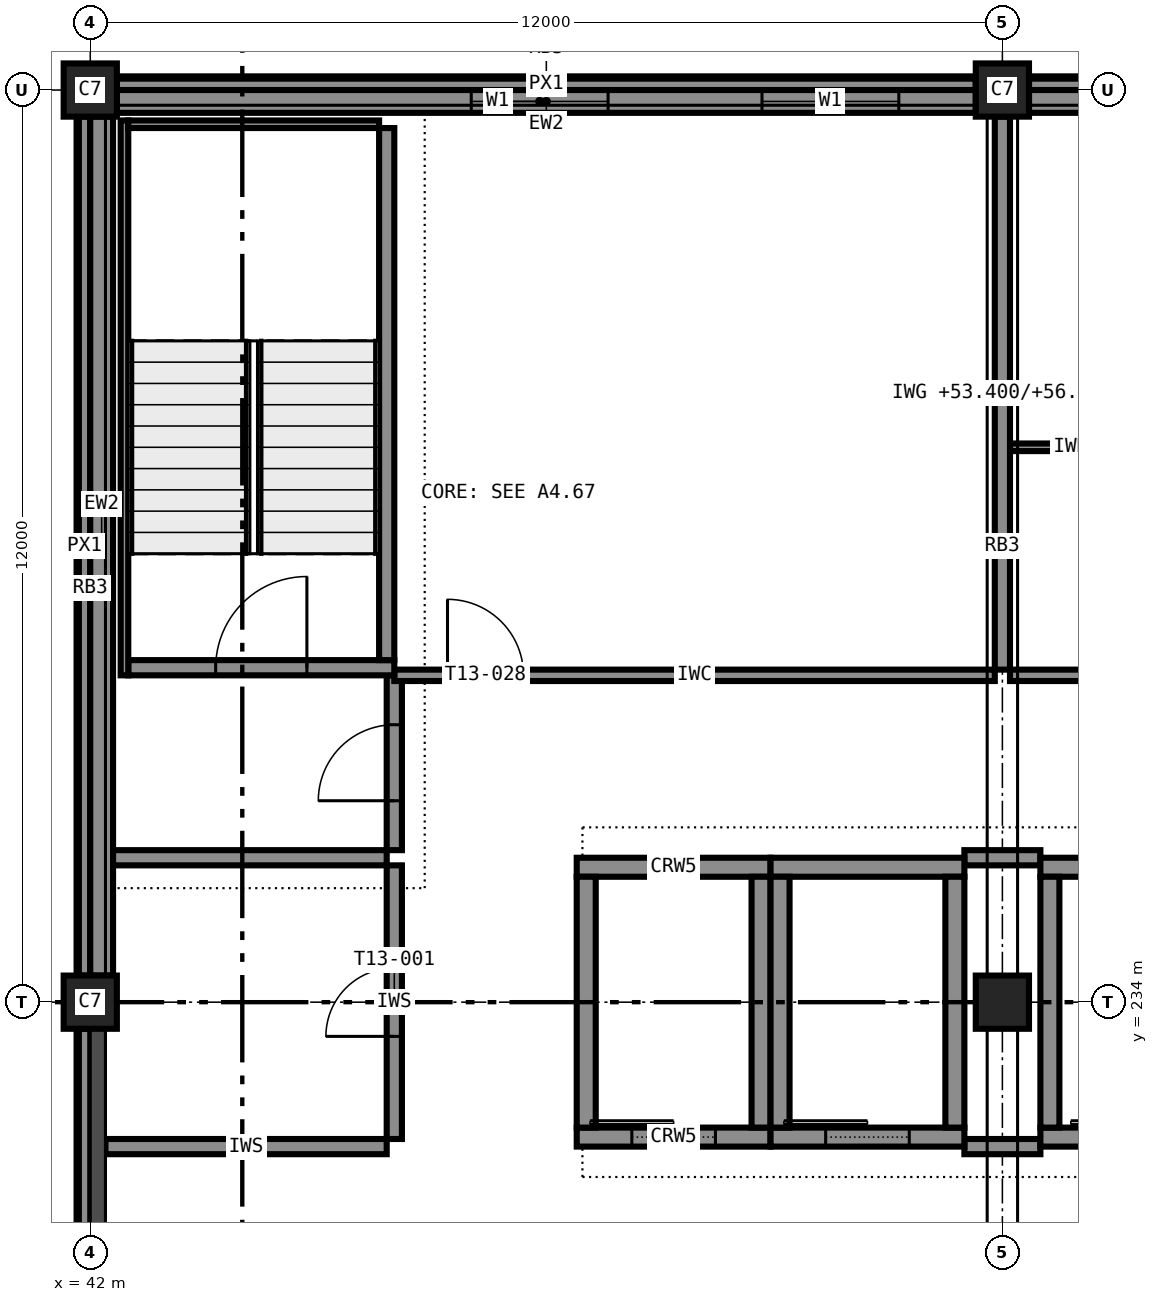
"""IFC4 building model, lengths in metres.
Left out: names, types, materials, properties, quantities, classifications, styles, units other than length and angle.
Written with IfcOpenShell. Run it as: python <this file> out.ifc"""

import sys

from ifc_helpers import new_model, si_unit, direction, frame, frame_2d, origin, origin_2d, place, context, subcontext, project, spatial, rectangle, extrude, element, fill, save


model = new_model("IFC4")
c1 = context("Model", 3, precision=1e-05, world=origin(), true_north=direction((0.0, 1.0)))
c2 = subcontext(c1, "Body", "Model", "MODEL_VIEW")
j1 = project(units=[si_unit("LENGTHUNIT", "METRE"), si_unit("PLANEANGLEUNIT", "RADIAN")], contexts=[c1])
p1 = place(None, origin())
s1 = spatial("IfcSite", under=j1, at=p1, CompositionType="ELEMENT")
p2 = place(p1, origin())
s2 = spatial("IfcBuilding", under=s1, at=p2, CompositionType="ELEMENT")
p3 = place(p2, frame((0.0, 0.0, 53.4)))
s3 = spatial("IfcBuildingStorey", under=s2, at=p3, CompositionType="ELEMENT", Elevation=53.4)
for number, where, z_axis, x_axis in (
    (1, (42.0, 234.0, 0.0), (0.0, 0.0, 1.0), (1.0, 0.0, 0.0)),
    (2, (42.0, 246.0, 0.0), (0.0, 0.0, 1.0), (1.0, 0.0, 0.0)),
    (3, (54.0, 234.0, 0.0), (0.0, 0.0, 1.0), (1.0, 0.0, 0.0)),
    (4, (54.0, 246.0, 0.0), (0.0, 0.0, 1.0), (1.0, 0.0, 0.0)),
):
    element("IfcColumn", number, at=place(p3, frame(where, z_axis=z_axis, x_axis=x_axis)), inside=s3, PredefinedType="COLUMN", context=c2, shape_type="SweptSolid", body=[
        extrude(rectangle(XDim=0.7, YDim=0.7, at=origin_2d()), origin(), (0.0, 0.0, 1.0), 3.6),
    ])
p4 = place(p3, frame((54.5, 232.225, 0.0), z_axis=(0.0, 0.0, 1.0), x_axis=(1.0, 0.0, 0.0)))
e5 = element("IfcWall", 5, at=p4, inside=s3, PredefinedType="SHEAR", context=c2, shape_type="SweptSolid", body=[
    extrude(rectangle(XDim=3.0, YDim=0.25, at=frame_2d((1.5, 0.0))), origin(), (0.0, 0.0, 1.0), 3.6),
])
p5 = place(p4, frame((0.95, 0.0, 0.0)))
e6 = element("IfcOpeningElement", 6, at=p5, cuts=e5, PredefinedType="OPENING", context=c2, shape_type="SweptSolid", body=[
    extrude(rectangle(XDim=1.1, YDim=2.1, at=frame_2d((0.55, 1.05))), frame((0.0, 0.135, 0.0), z_axis=(0.0, -1.0, 0.0), x_axis=(1.0, 0.0, 0.0)), (0.0, 0.0, 1.0), 0.27),
])
p6 = place(p3, frame((54.5, 235.775, 0.0), z_axis=(0.0, 0.0, 1.0), x_axis=(1.0, 0.0, 0.0)))
e7 = element("IfcWall", 7, at=p6, inside=s3, PredefinedType="SHEAR", context=c2, shape_type="SweptSolid", body=[
    extrude(rectangle(XDim=3.0, YDim=0.25, at=frame_2d((1.5, 0.0))), origin(), (0.0, 0.0, 1.0), 3.6),
])
p7 = place(p3, frame((54.625, 232.35, 0.0), z_axis=(0.0, 0.0, 1.0), x_axis=(0.0, 1.0, 0.0)))
e8 = element("IfcWall", 8, at=p7, inside=s3, PredefinedType="SHEAR", context=c2, shape_type="SweptSolid", body=[
    extrude(rectangle(XDim=3.3, YDim=0.25, at=frame_2d((1.65, 0.0))), origin(), (0.0, 0.0, 1.0), 3.6),
])
p8 = place(p3, frame((48.4, 232.225, 0.0), z_axis=(0.0, 0.0, 1.0), x_axis=(1.0, 0.0, 0.0)))
e9 = element("IfcWall", 9, at=p8, inside=s3, PredefinedType="SHEAR", context=c2, shape_type="SweptSolid", body=[
    extrude(rectangle(XDim=2.55, YDim=0.25, at=frame_2d((1.275, 0.0))), origin(), (0.0, 0.0, 1.0), 3.6),
])
p9 = place(p8, frame((0.725, 0.0, 0.0)))
e10 = element("IfcOpeningElement", 10, at=p9, cuts=e9, PredefinedType="OPENING", context=c2, shape_type="SweptSolid", body=[
    extrude(rectangle(XDim=1.1, YDim=2.1, at=frame_2d((0.55, 1.05))), frame((0.0, 0.135, 0.0), z_axis=(0.0, -1.0, 0.0), x_axis=(1.0, 0.0, 0.0)), (0.0, 0.0, 1.0), 0.27),
])
p10 = place(p3, frame((48.4, 235.775, 0.0), z_axis=(0.0, 0.0, 1.0), x_axis=(1.0, 0.0, 0.0)))
e11 = element("IfcWall", 11, at=p10, inside=s3, PredefinedType="SHEAR", context=c2, shape_type="SweptSolid", body=[
    extrude(rectangle(XDim=2.55, YDim=0.25, at=frame_2d((1.275, 0.0))), origin(), (0.0, 0.0, 1.0), 3.6),
])
for number, where, z_axis, x_axis in (
    (12, (48.525, 232.35, 0.0), (0.0, 0.0, 1.0), (0.0, 1.0, 0.0)),
    (13, (50.825, 232.35, 0.0), (0.0, 0.0, 1.0), (0.0, 1.0, 0.0)),
):
    element("IfcWall", number, at=place(p3, frame(where, z_axis=z_axis, x_axis=x_axis)), inside=s3, PredefinedType="SHEAR", context=c2, shape_type="SweptSolid", body=[
        extrude(rectangle(XDim=3.3, YDim=0.25, at=frame_2d((1.65, 0.0))), origin(), (0.0, 0.0, 1.0), 3.6),
    ])
p11 = place(p3, frame((50.95, 232.225, 0.0), z_axis=(0.0, 0.0, 1.0), x_axis=(1.0, 0.0, 0.0)))
e14 = element("IfcWall", 14, at=p11, inside=s3, PredefinedType="SHEAR", context=c2, shape_type="SweptSolid", body=[
    extrude(rectangle(XDim=2.55, YDim=0.25, at=frame_2d((1.275, 0.0))), origin(), (0.0, 0.0, 1.0), 3.6),
])
p12 = place(p11, frame((0.725, 0.0, 0.0)))
e15 = element("IfcOpeningElement", 15, at=p12, cuts=e14, PredefinedType="OPENING", context=c2, shape_type="SweptSolid", body=[
    extrude(rectangle(XDim=1.1, YDim=2.1, at=frame_2d((0.55, 1.05))), frame((0.0, 0.135, 0.0), z_axis=(0.0, -1.0, 0.0), x_axis=(1.0, 0.0, 0.0)), (0.0, 0.0, 1.0), 0.27),
])
p13 = place(p3, frame((50.95, 235.775, 0.0), z_axis=(0.0, 0.0, 1.0), x_axis=(1.0, 0.0, 0.0)))
e16 = element("IfcWall", 16, at=p13, inside=s3, PredefinedType="SHEAR", context=c2, shape_type="SweptSolid", body=[
    extrude(rectangle(XDim=2.55, YDim=0.25, at=frame_2d((1.275, 0.0))), origin(), (0.0, 0.0, 1.0), 3.6),
])
for number, where, z_axis, x_axis in (
    (17, (51.075, 232.35, 0.0), (0.0, 0.0, 1.0), (0.0, 1.0, 0.0)),
    (18, (53.375, 232.35, 0.0), (0.0, 0.0, 1.0), (0.0, 1.0, 0.0)),
):
    element("IfcWall", number, at=place(p3, frame(where, z_axis=z_axis, x_axis=x_axis)), inside=s3, PredefinedType="SHEAR", context=c2, shape_type="SweptSolid", body=[
        extrude(rectangle(XDim=3.3, YDim=0.25, at=frame_2d((1.65, 0.0))), origin(), (0.0, 0.0, 1.0), 3.6),
    ])
p14 = place(p3, frame((42.5, 238.4, 0.0), z_axis=(0.0, 0.0, 1.0), x_axis=(1.0, 0.0, 0.0)))
e19 = element("IfcWall", 19, at=p14, inside=s3, PredefinedType="SHEAR", context=c2, shape_type="SweptSolid", body=[
    extrude(rectangle(XDim=3.5, YDim=0.2, at=frame_2d((1.75, 0.0))), origin(), (0.0, 0.0, 1.0), 3.6),
])
p15 = place(p14, frame((1.15, 0.0, 0.0)))
e20 = element("IfcOpeningElement", 20, at=p15, cuts=e19, PredefinedType="OPENING", context=c2, shape_type="SweptSolid", body=[
    extrude(rectangle(XDim=1.2, YDim=2.1, at=frame_2d((0.6, 1.05))), frame((0.0, 0.11, 0.0), z_axis=(0.0, -1.0, 0.0), x_axis=(1.0, 0.0, 0.0)), (0.0, 0.0, 1.0), 0.22),
])
p16 = place(p3, frame((45.9, 238.5, 0.0), z_axis=(0.0, 0.0, 1.0), x_axis=(0.0, 1.0, 0.0)))
e21 = element("IfcWall", 21, at=p16, inside=s3, PredefinedType="SHEAR", context=c2, shape_type="SweptSolid", body=[
    extrude(rectangle(XDim=7.0, YDim=0.2, at=frame_2d((3.5, 0.0))), origin(), (0.0, 0.0, 1.0), 3.6),
])
p17 = place(p3, frame((42.45, 238.3, 0.0), z_axis=(0.0, 0.0, 1.0), x_axis=(0.0, 1.0, 0.0)))
e22 = element("IfcWall", 22, at=p17, inside=s3, PredefinedType="SHEAR", context=c2, shape_type="SweptSolid", body=[
    extrude(rectangle(XDim=7.3, YDim=0.1, at=frame_2d((3.65, 0.0))), origin(), (0.0, 0.0, 1.0), 3.4),
])
p18 = place(p3, frame((42.5, 245.55, 0.0), z_axis=(0.0, 0.0, 1.0), x_axis=(1.0, 0.0, 0.0)))
e23 = element("IfcWall", 23, at=p18, inside=s3, PredefinedType="SHEAR", context=c2, shape_type="SweptSolid", body=[
    extrude(rectangle(XDim=3.3, YDim=0.1, at=frame_2d((1.65, 0.0))), origin(), (0.0, 0.0, 1.0), 3.4),
])
p19 = place(p3, frame((65.65, 245.85, 0.0), z_axis=(0.0, 0.0, 1.0), x_axis=(-1.0, 0.0, 0.0)))
e24 = element("IfcWall", 24, at=p19, inside=s3, PredefinedType="STANDARD", context=c2, shape_type="SweptSolid", body=[
    extrude(rectangle(XDim=11.3, YDim=0.3, at=frame_2d((5.65, 0.0))), origin(), (0.0, 0.0, 1.0), 2.6),
])
p20 = place(p19, frame((8.575, 0.0, 0.85)))
e25 = element("IfcOpeningElement", 25, at=p20, cuts=e24, PredefinedType="OPENING", context=c2, shape_type="SweptSolid", body=[
    extrude(rectangle(XDim=1.8, YDim=1.75, at=frame_2d((0.9, 0.875))), frame((0.0, 0.16, 0.0), z_axis=(0.0, -1.0, 0.0), x_axis=(1.0, 0.0, 0.0)), (0.0, 0.0, 1.0), 0.32),
])
p21 = place(p19, frame((4.75, 0.0, 0.85)))
e26 = element("IfcOpeningElement", 26, at=p21, cuts=e24, PredefinedType="OPENING", context=c2, shape_type="SweptSolid", body=[
    extrude(rectangle(XDim=1.8, YDim=1.75, at=frame_2d((0.9, 0.875))), frame((0.0, 0.16, 0.0), z_axis=(0.0, -1.0, 0.0), x_axis=(1.0, 0.0, 0.0)), (0.0, 0.0, 1.0), 0.32),
])
p22 = place(p19, frame((0.925, 0.0, 0.85)))
e27 = element("IfcOpeningElement", 27, at=p22, cuts=e24, PredefinedType="OPENING", context=c2, shape_type="SweptSolid", body=[
    extrude(rectangle(XDim=1.8, YDim=1.75, at=frame_2d((0.9, 0.875))), frame((0.0, 0.16, 0.0), z_axis=(0.0, -1.0, 0.0), x_axis=(1.0, 0.0, 0.0)), (0.0, 0.0, 1.0), 0.32),
])
p23 = place(p3, frame((53.65, 245.85, 0.0), z_axis=(0.0, 0.0, 1.0), x_axis=(-1.0, 0.0, 0.0)))
e28 = element("IfcWall", 28, at=p23, inside=s3, PredefinedType="STANDARD", context=c2, shape_type="SweptSolid", body=[
    extrude(rectangle(XDim=11.3, YDim=0.3, at=frame_2d((5.65, 0.0))), origin(), (0.0, 0.0, 1.0), 2.6),
])
p24 = place(p23, frame((1.012, 0.0, 0.85)))
e29 = element("IfcOpeningElement", 29, at=p24, cuts=e28, PredefinedType="OPENING", context=c2, shape_type="SweptSolid", body=[
    extrude(rectangle(XDim=1.8, YDim=1.75, at=frame_2d((0.9, 0.875))), frame((0.0, 0.16, 0.0), z_axis=(0.0, -1.0, 0.0), x_axis=(1.0, 0.0, 0.0)), (0.0, 0.0, 1.0), 0.32),
])
p25 = place(p23, frame((4.837, 0.0, 0.85)))
e30 = element("IfcOpeningElement", 30, at=p25, cuts=e28, PredefinedType="OPENING", context=c2, shape_type="SweptSolid", body=[
    extrude(rectangle(XDim=1.8, YDim=1.75, at=frame_2d((0.9, 0.875))), frame((0.0, 0.16, 0.0), z_axis=(0.0, -1.0, 0.0), x_axis=(1.0, 0.0, 0.0)), (0.0, 0.0, 1.0), 0.32),
])
for number, where, z_axis, x_axis in (
    (31, (65.65, 246.075, 3.4), (0.0, 0.0, 1.0), (-1.0, 0.0, 0.0)),
    (32, (53.65, 246.075, 3.4), (0.0, 0.0, 1.0), (-1.0, 0.0, 0.0)),
):
    element("IfcWall", number, at=place(p3, frame(where, z_axis=z_axis, x_axis=x_axis)), inside=s3, PredefinedType="STANDARD", context=c2, shape_type="SweptSolid", body=[
        extrude(rectangle(XDim=11.3, YDim=0.15, at=frame_2d((5.65, 0.0))), origin(), (0.0, 0.0, 1.0), 0.2),
    ])
p26 = place(p3, frame((42.15, 245.65, 0.0), z_axis=(0.0, 0.0, 1.0), x_axis=(0.0, -1.0, 0.0)))
e33 = element("IfcWall", 33, at=p26, inside=s3, PredefinedType="STANDARD", context=c2, shape_type="SweptSolid", body=[
    extrude(rectangle(XDim=11.3, YDim=0.3, at=frame_2d((5.65, 0.0))), origin(), (0.0, 0.0, 1.0), 2.6),
])
for number, where, z_axis, x_axis in (
    (34, (41.925, 245.65, 3.4), (0.0, 0.0, 1.0), (0.0, -1.0, 0.0)),
    (35, (41.925, 233.65, 3.4), (0.0, 0.0, 1.0), (0.0, -1.0, 0.0)),
):
    element("IfcWall", number, at=place(p3, frame(where, z_axis=z_axis, x_axis=x_axis)), inside=s3, PredefinedType="STANDARD", context=c2, shape_type="SweptSolid", body=[
        extrude(rectangle(XDim=11.3, YDim=0.15, at=frame_2d((5.65, 0.0))), origin(), (0.0, 0.0, 1.0), 0.2),
    ])
p27 = place(p3, frame((42.2, 232.1, 0.0), z_axis=(0.0, 0.0, 1.0), x_axis=(1.0, 0.0, 0.0)))
e36 = element("IfcWall", 36, at=p27, inside=s3, PredefinedType="PARTITIONING", context=c2, shape_type="SweptSolid", body=[
    extrude(rectangle(XDim=3.7, YDim=0.2, at=frame_2d((1.85, 0.0))), origin(), (0.0, 0.0, 1.0), 3.4),
])
p28 = place(p3, frame((53.5, 232.1, 0.0), z_axis=(0.0, 0.0, 1.0), x_axis=(1.0, 0.0, 0.0)))
e37 = element("IfcWall", 37, at=p28, inside=s3, PredefinedType="PARTITIONING", context=c2, shape_type="SweptSolid", body=[
    extrude(rectangle(XDim=1.0, YDim=0.2, at=frame_2d((0.5, 0.0))), origin(), (0.0, 0.0, 1.0), 3.4),
])
p29 = place(p3, frame((42.3, 235.9, 0.0), z_axis=(0.0, 0.0, 1.0), x_axis=(1.0, 0.0, 0.0)))
e38 = element("IfcWall", 38, at=p29, inside=s3, PredefinedType="PARTITIONING", context=c2, shape_type="SweptSolid", body=[
    extrude(rectangle(XDim=3.6, YDim=0.2, at=frame_2d((1.8, 0.0))), origin(), (0.0, 0.0, 1.0), 3.4),
])
p30 = place(p3, frame((53.5, 235.9, 0.0), z_axis=(0.0, 0.0, 1.0), x_axis=(1.0, 0.0, 0.0)))
e39 = element("IfcWall", 39, at=p30, inside=s3, PredefinedType="PARTITIONING", context=c2, shape_type="SweptSolid", body=[
    extrude(rectangle(XDim=1.0, YDim=0.2, at=frame_2d((0.5, 0.0))), origin(), (0.0, 0.0, 1.0), 3.4),
])
p31 = place(p3, frame((46.0, 232.2, 0.0), z_axis=(0.0, 0.0, 1.0), x_axis=(0.0, 1.0, 0.0)))
e40 = element("IfcWall", 40, at=p31, inside=s3, PredefinedType="PARTITIONING", context=c2, shape_type="SweptSolid", body=[
    extrude(rectangle(XDim=3.6, YDim=0.2, at=frame_2d((1.8, 0.0))), origin(), (0.0, 0.0, 1.0), 3.4),
])
p32 = place(p31, frame((1.35, 0.0, 0.0)))
e41 = element("IfcOpeningElement", 41, at=p32, cuts=e40, PredefinedType="OPENING", context=c2, shape_type="SweptSolid", body=[
    extrude(rectangle(XDim=0.9, YDim=2.1, at=frame_2d((0.45, 1.05))), frame((0.0, 0.11, 0.0), z_axis=(0.0, -1.0, 0.0), x_axis=(1.0, 0.0, 0.0)), (0.0, 0.0, 1.0), 0.22),
])
p33 = place(p3, frame((46.0, 236.0, 0.0), z_axis=(0.0, 0.0, 1.0), x_axis=(0.0, 1.0, 0.0)))
e42 = element("IfcWall", 42, at=p33, inside=s3, PredefinedType="PARTITIONING", context=c2, shape_type="SweptSolid", body=[
    extrude(rectangle(XDim=2.3, YDim=0.2, at=frame_2d((1.15, 0.0))), origin(), (0.0, 0.0, 1.0), 3.4),
])
p34 = place(p33, frame((0.65, 0.0, 0.0)))
e43 = element("IfcOpeningElement", 43, at=p34, cuts=e42, PredefinedType="OPENING", context=c2, shape_type="SweptSolid", body=[
    extrude(rectangle(XDim=1.0, YDim=2.1, at=frame_2d((0.5, 1.05))), frame((0.0, 0.11, 0.0), z_axis=(0.0, -1.0, 0.0), x_axis=(1.0, 0.0, 0.0)), (0.0, 0.0, 1.0), 0.22),
])
p35 = place(p3, frame((46.0, 238.3, 0.0), z_axis=(0.0, 0.0, 1.0), x_axis=(1.0, 0.0, 0.0)))
e44 = element("IfcWall", 44, at=p35, inside=s3, PredefinedType="PARTITIONING", context=c2, shape_type="SweptSolid", body=[
    extrude(rectangle(XDim=7.9, YDim=0.15, at=frame_2d((3.95, 0.0))), origin(), (0.0, 0.0, 1.0), 3.4),
])
p36 = place(p35, frame((0.7, 0.0, 0.0)))
e45 = element("IfcOpeningElement", 45, at=p36, cuts=e44, PredefinedType="OPENING", context=c2, shape_type="SweptSolid", body=[
    extrude(rectangle(XDim=1.0, YDim=2.1, at=frame_2d((0.5, 1.05))), frame((0.0, 0.085, 0.0), z_axis=(0.0, -1.0, 0.0), x_axis=(1.0, 0.0, 0.0)), (0.0, 0.0, 1.0), 0.17),
])
p37 = place(p3, frame((54.1, 238.3, 0.0), z_axis=(0.0, 0.0, 1.0), x_axis=(1.0, 0.0, 0.0)))
e46 = element("IfcWall", 46, at=p37, inside=s3, PredefinedType="PARTITIONING", context=c2, shape_type="SweptSolid", body=[
    extrude(rectangle(XDim=3.8, YDim=0.15, at=frame_2d((1.9, 0.0))), origin(), (0.0, 0.0, 1.0), 3.4),
])
p38 = place(p37, frame((2.25, 0.0, 0.0)))
e47 = element("IfcOpeningElement", 47, at=p38, cuts=e46, PredefinedType="OPENING", context=c2, shape_type="SweptSolid", body=[
    extrude(rectangle(XDim=1.0, YDim=2.1, at=frame_2d((0.5, 1.05))), frame((0.0, 0.085, 0.0), z_axis=(0.0, -1.0, 0.0), x_axis=(1.0, 0.0, 0.0)), (0.0, 0.0, 1.0), 0.17),
])
p39 = place(p3, frame((54.1, 241.3, 0.0), z_axis=(0.0, 0.0, 1.0), x_axis=(1.0, 0.0, 0.0)))
e48 = element("IfcWall", 48, at=p39, inside=s3, PredefinedType="PARTITIONING", context=c2, shape_type="SweptSolid", body=[
    extrude(rectangle(XDim=1.6, YDim=0.1, at=frame_2d((0.8, 0.0))), origin(), (0.0, 0.0, 1.0), 3.4),
])
p40 = place(p3, frame((54.0, 245.65, 0.0), z_axis=(0.0, 0.0, 1.0), x_axis=(0.0, -1.0, 0.0)))
e49 = element("IfcWall", 49, at=p40, inside=s3, PredefinedType="PARTITIONING", context=c2, shape_type="SweptSolid", body=[
    extrude(rectangle(XDim=7.275, YDim=0.2, at=frame_2d((3.637, 0.0))), origin(), (0.0, 0.0, 1.0), 2.6),
])
p41 = place(p24, origin())
e50 = element("IfcWindow", 50, at=p41, inside=s3, PartitioningType="SINGLE_PANEL", PredefinedType="WINDOW", context=c2, shape_type="SweptSolid", body=[
    extrude(rectangle(XDim=1.8, YDim=1.75, at=frame_2d((0.9, 0.875))), frame((0.0, 0.03, 0.0), z_axis=(0.0, -1.0, 0.0), x_axis=(1.0, 0.0, 0.0)), (0.0, 0.0, 1.0), 0.06),
])
fill(e29, e50)
p42 = place(p25, origin())
e51 = element("IfcWindow", 51, at=p42, inside=s3, PartitioningType="SINGLE_PANEL", PredefinedType="WINDOW", context=c2, shape_type="SweptSolid", body=[
    extrude(rectangle(XDim=1.8, YDim=1.75, at=frame_2d((0.9, 0.875))), frame((0.0, 0.03, 0.0), z_axis=(0.0, -1.0, 0.0), x_axis=(1.0, 0.0, 0.0)), (0.0, 0.0, 1.0), 0.06),
])
fill(e30, e51)
p43 = place(p32, origin())
e52 = element("IfcDoor", 52, at=p43, inside=s3, OperationType="SINGLE_SWING_LEFT", PredefinedType="DOOR", context=c2, shape_type="SweptSolid", body=[
    extrude(rectangle(XDim=0.9, YDim=2.1, at=frame_2d((0.45, 1.05))), frame((0.0, 0.025, 0.0), z_axis=(0.0, -1.0, 0.0), x_axis=(1.0, 0.0, 0.0)), (0.0, 0.0, 1.0), 0.05),
])
fill(e41, e52)
p44 = place(p34, origin())
e53 = element("IfcDoor", 53, at=p44, inside=s3, OperationType="SINGLE_SWING_LEFT", PredefinedType="DOOR", context=c2, shape_type="SweptSolid", body=[
    extrude(rectangle(XDim=1.0, YDim=2.1, at=frame_2d((0.5, 1.05))), frame((0.0, 0.025, 0.0), z_axis=(0.0, -1.0, 0.0), x_axis=(1.0, 0.0, 0.0)), (0.0, 0.0, 1.0), 0.05),
])
fill(e43, e53)
p45 = place(p36, origin())
e54 = element("IfcDoor", 54, at=p45, inside=s3, OperationType="SINGLE_SWING_LEFT", PredefinedType="DOOR", context=c2, shape_type="SweptSolid", body=[
    extrude(rectangle(XDim=1.0, YDim=2.1, at=frame_2d((0.5, 1.05))), frame((0.0, 0.025, 0.0), z_axis=(0.0, -1.0, 0.0), x_axis=(1.0, 0.0, 0.0)), (0.0, 0.0, 1.0), 0.05),
])
fill(e45, e54)
p46 = place(p9, origin())
e55 = element("IfcDoor", 55, at=p46, inside=s3, OperationType="SLIDING_TO_LEFT", PredefinedType="DOOR", context=c2, shape_type="SweptSolid", body=[
    extrude(rectangle(XDim=1.1, YDim=2.1, at=frame_2d((0.55, 1.05))), frame((0.0, 0.025, 0.0), z_axis=(0.0, -1.0, 0.0), x_axis=(1.0, 0.0, 0.0)), (0.0, 0.0, 1.0), 0.05),
])
fill(e10, e55)
p47 = place(p12, origin())
e56 = element("IfcDoor", 56, at=p47, inside=s3, OperationType="SLIDING_TO_LEFT", PredefinedType="DOOR", context=c2, shape_type="SweptSolid", body=[
    extrude(rectangle(XDim=1.1, YDim=2.1, at=frame_2d((0.55, 1.05))), frame((0.0, 0.025, 0.0), z_axis=(0.0, -1.0, 0.0), x_axis=(1.0, 0.0, 0.0)), (0.0, 0.0, 1.0), 0.05),
])
fill(e15, e56)
p48 = place(p15, origin())
e57 = element("IfcDoor", 57, at=p48, inside=s3, OperationType="SINGLE_SWING_RIGHT", PredefinedType="DOOR", context=c2, shape_type="SweptSolid", body=[
    extrude(rectangle(XDim=1.2, YDim=2.1, at=frame_2d((0.6, 1.05))), frame((0.0, 0.025, 0.0), z_axis=(0.0, -1.0, 0.0), x_axis=(1.0, 0.0, 0.0)), (0.0, 0.0, 1.0), 0.05),
])
fill(e20, e57)
save(model, sys.argv[1])
